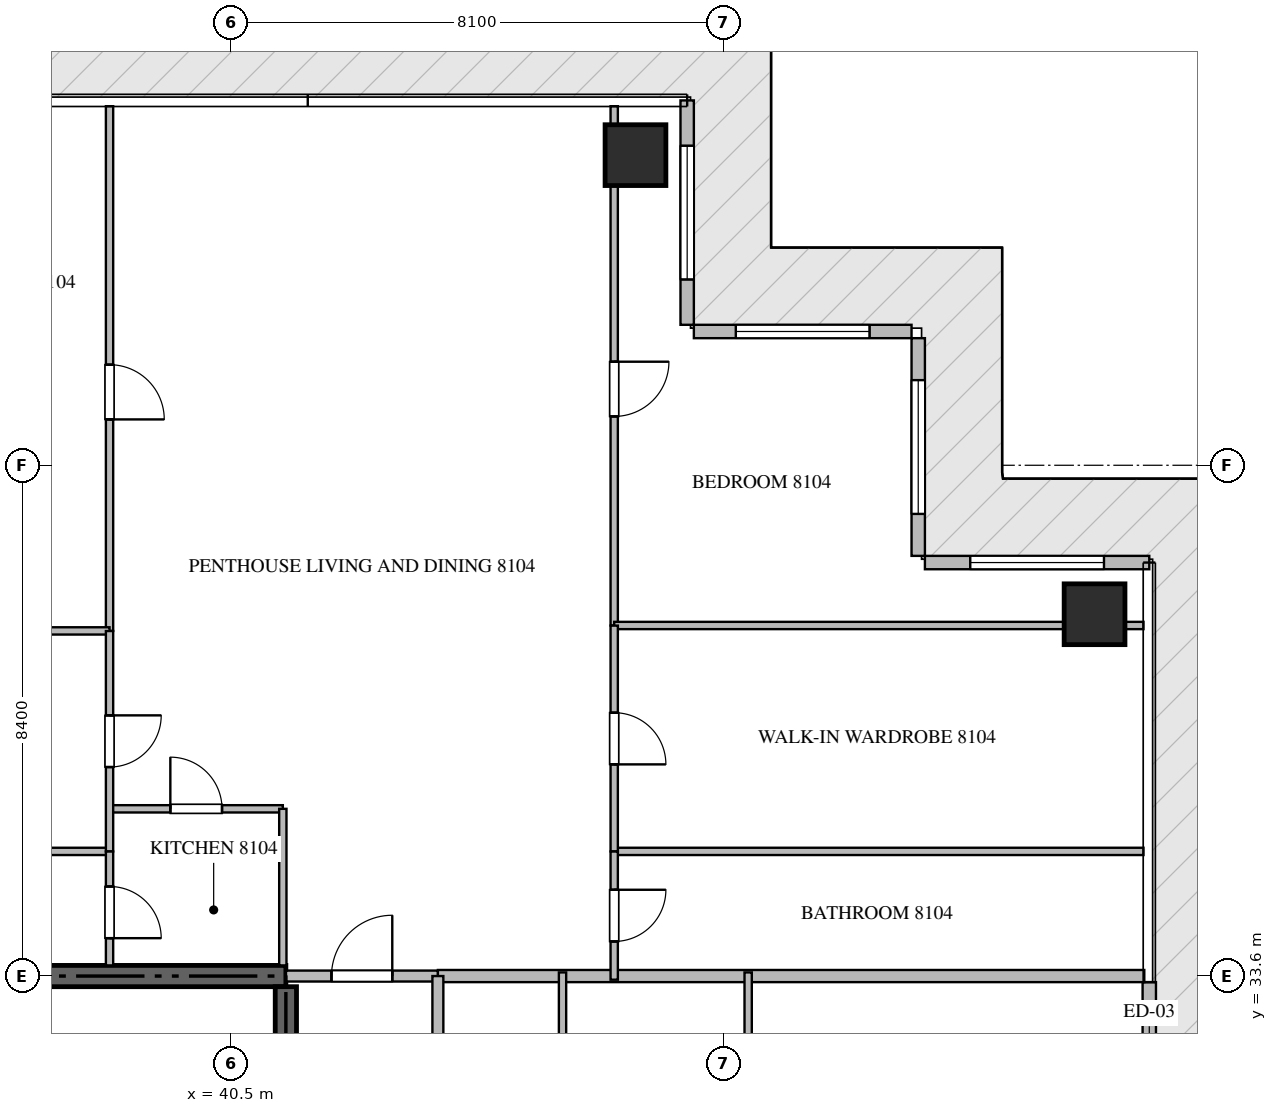
"""IFC4 building model, lengths in metres.
Left out: names, types, materials, properties, quantities, classifications, styles, units other than length and angle.
Written with IfcOpenShell. Run it as: python <this file> out.ifc"""

import sys

from ifc_helpers import new_model, si_unit, direction, frame, frame_2d, origin, origin_2d, place, context, subcontext, project, spatial, rectangle, extrude, source, transform, mapped, element, fill, save


model = new_model("IFC4")
c1 = context("Model", 3, precision=1e-05, world=origin(), true_north=direction((0.0, 1.0)))
c2 = subcontext(c1, "Body", "Model", "MODEL_VIEW")
j1 = project(units=[si_unit("LENGTHUNIT", "METRE"), si_unit("PLANEANGLEUNIT", "RADIAN")], contexts=[c1])
p1 = place(None, origin())
s1 = spatial("IfcSite", under=j1, at=p1, CompositionType="ELEMENT")
p2 = place(p1, origin())
s2 = spatial("IfcBuilding", under=s1, at=p2, CompositionType="ELEMENT")
p3 = place(p2, frame((0.0, 0.0, 325.85)))
s3 = spatial("IfcBuildingStorey", under=s2, at=p3, CompositionType="ELEMENT", Elevation=325.85)
p4 = place(p3, frame((41.4, 33.6, -0.26), z_axis=(0.0, 0.0, 1.0), x_axis=(-1.0, 0.0, 0.0)))
e1 = element("IfcWall", 1, at=p4, inside=s3, PredefinedType="SHEAR", context=c2, shape_type="SweptSolid", body=[
    extrude(rectangle(XDim=18.0, YDim=0.35, at=frame_2d((9.0, 0.0))), origin(), (0.0, 0.0, 1.0), 4.048),
])
p5 = place(p3, frame((41.4, 27.75, -0.26), z_axis=(0.0, 0.0, 1.0), x_axis=(0.0, 1.0, 0.0)))
e2 = element("IfcWall", 2, at=p5, inside=s3, PredefinedType="SHEAR", context=c2, shape_type="SweptSolid", body=[
    extrude(rectangle(XDim=5.675, YDim=0.35, at=frame_2d((2.837, 0.0))), origin(), (0.0, 0.0, 1.0), 4.048),
])
m1 = source(origin(), c2, "Body", "SweptSolid", [
    extrude(rectangle(XDim=1.0, YDim=1.0, at=origin_2d()), origin(), (0.0, 0.0, 1.0), 4.05),
])
for number, where, z_axis, x_axis in (
    (3, (47.15, 47.1, -0.26), (0.0, 0.0, 1.0), (1.0, 0.0, 0.0)),
    (4, (54.7, 39.55, -0.26), (0.0, 0.0, 1.0), (1.0, 0.0, 0.0)),
):
    element("IfcColumn", number, at=place(p3, frame(where, z_axis=z_axis, x_axis=x_axis)), inside=s3, PredefinedType="COLUMN", context=c2, shape_type="MappedRepresentation", body=[
        mapped(m1, transform((0.0, 0.0, 0.0), scale=1.0)),
    ])
p6 = place(p3, frame((55.6, 30.5, 0.0), z_axis=(0.0, 0.0, 1.0), x_axis=(0.0, 1.0, 0.0)))
e5 = element("IfcWall", 5, at=p6, inside=s3, PredefinedType="ELEMENTEDWALL", context=c2, shape_type="SweptSolid", body=[
    extrude(rectangle(XDim=3.0, YDim=0.22, at=frame_2d((1.5, 0.0))), origin(), (0.0, 0.0, 1.0), 3.775),
])
p7 = place(p6, frame((0.95, 0.0, 0.0)))
e6 = element("IfcOpeningElement", 6, at=p7, cuts=e5, PredefinedType="OPENING", context=c2, shape_type="SweptSolid", body=[
    extrude(rectangle(XDim=1.1, YDim=2.2, at=frame_2d((0.55, 1.1))), frame((0.0, 0.12, 0.0), z_axis=(0.0, -1.0, 0.0), x_axis=(1.0, 0.0, 0.0)), (0.0, 0.0, 1.0), 0.24),
])
p8 = place(p3, frame((55.6, 40.4, 0.0), z_axis=(0.0, 0.0, 1.0), x_axis=(-1.0, 0.0, 0.0)))
e7 = element("IfcWall", 7, at=p8, inside=s3, PredefinedType="ELEMENTEDWALL", context=c2, shape_type="SweptSolid", body=[
    extrude(rectangle(XDim=3.69, YDim=0.22, at=frame_2d((1.845, 0.0))), origin(), (0.0, 0.0, 1.0), 3.775),
])
p9 = place(p8, frame((0.745, 0.0, 0.65)))
e8 = element("IfcOpeningElement", 8, at=p9, cuts=e7, PredefinedType="OPENING", context=c2, shape_type="SweptSolid", body=[
    extrude(rectangle(XDim=2.2, YDim=2.4, at=frame_2d((1.1, 1.2))), frame((0.0, 0.12, 0.0), z_axis=(0.0, -1.0, 0.0), x_axis=(1.0, 0.0, 0.0)), (0.0, 0.0, 1.0), 0.24),
])
p10 = place(p3, frame((51.8, 40.51, 0.0), z_axis=(0.0, 0.0, 1.0), x_axis=(0.0, 1.0, 0.0)))
e9 = element("IfcWall", 9, at=p10, inside=s3, PredefinedType="ELEMENTEDWALL", context=c2, shape_type="SweptSolid", body=[
    extrude(rectangle(XDim=3.58, YDim=0.22, at=frame_2d((1.79, 0.0))), origin(), (0.0, 0.0, 1.0), 3.775),
])
p11 = place(p10, frame((0.69, 0.0, 0.65)))
e10 = element("IfcOpeningElement", 10, at=p11, cuts=e9, PredefinedType="OPENING", context=c2, shape_type="SweptSolid", body=[
    extrude(rectangle(XDim=2.2, YDim=2.4, at=frame_2d((1.1, 1.2))), frame((0.0, 0.12, 0.0), z_axis=(0.0, -1.0, 0.0), x_axis=(1.0, 0.0, 0.0)), (0.0, 0.0, 1.0), 0.24),
])
p12 = place(p3, frame((51.69, 44.2, 0.0), z_axis=(0.0, 0.0, 1.0), x_axis=(-1.0, 0.0, 0.0)))
e11 = element("IfcWall", 11, at=p12, inside=s3, PredefinedType="ELEMENTEDWALL", context=c2, shape_type="SweptSolid", body=[
    extrude(rectangle(XDim=3.58, YDim=0.22, at=frame_2d((1.79, 0.0))), origin(), (0.0, 0.0, 1.0), 3.775),
])
p13 = place(p12, frame((0.69, 0.0, 0.65)))
e12 = element("IfcOpeningElement", 12, at=p13, cuts=e11, PredefinedType="OPENING", context=c2, shape_type="SweptSolid", body=[
    extrude(rectangle(XDim=2.2, YDim=2.4, at=frame_2d((1.1, 1.2))), frame((0.0, 0.12, 0.0), z_axis=(0.0, -1.0, 0.0), x_axis=(1.0, 0.0, 0.0)), (0.0, 0.0, 1.0), 0.24),
])
p14 = place(p3, frame((48.0, 44.31, 0.0), z_axis=(0.0, 0.0, 1.0), x_axis=(0.0, 1.0, 0.0)))
e13 = element("IfcWall", 13, at=p14, inside=s3, PredefinedType="ELEMENTEDWALL", context=c2, shape_type="SweptSolid", body=[
    extrude(rectangle(XDim=3.69, YDim=0.22, at=frame_2d((1.845, 0.0))), origin(), (0.0, 0.0, 1.0), 3.775),
])
p15 = place(p14, frame((0.745, 0.0, 0.65)))
e14 = element("IfcOpeningElement", 14, at=p15, cuts=e13, PredefinedType="OPENING", context=c2, shape_type="SweptSolid", body=[
    extrude(rectangle(XDim=2.2, YDim=2.4, at=frame_2d((1.1, 1.2))), frame((0.0, 0.12, 0.0), z_axis=(0.0, -1.0, 0.0), x_axis=(1.0, 0.0, 0.0)), (0.0, 0.0, 1.0), 0.24),
])
p16 = place(p3, frame((43.9, 33.6, 0.0), z_axis=(0.0, 0.0, 1.0), x_axis=(1.0, 0.0, 0.0)))
e15 = element("IfcWall", 15, at=p16, inside=s3, PredefinedType="PARTITIONING", context=c2, shape_type="SweptSolid", body=[
    extrude(rectangle(XDim=11.618, YDim=0.2, at=frame_2d((5.809, 0.0))), origin(), (0.0, 0.0, 1.0), 3.79),
])
p17 = place(p3, frame((41.402, 33.6, 0.0), z_axis=(0.0, 0.0, 1.0), x_axis=(1.0, 0.0, 0.0)))
e16 = element("IfcWall", 16, at=p17, inside=s3, PredefinedType="PARTITIONING", context=c2, shape_type="SweptSolid", body=[
    extrude(rectangle(XDim=2.496, YDim=0.18, at=frame_2d((1.248, 0.0))), origin(), (0.0, 0.0, 1.0), 3.79),
])
p18 = place(p17, frame((0.748, 0.0, 0.0)))
e17 = element("IfcOpeningElement", 17, at=p18, cuts=e16, PredefinedType="OPENING", context=c2, shape_type="SweptSolid", body=[
    extrude(rectangle(XDim=1.0, YDim=2.15, at=frame_2d((0.5, 1.075))), frame((0.0, 0.1, 0.0), z_axis=(0.0, -1.0, 0.0), x_axis=(1.0, 0.0, 0.0)), (0.0, 0.0, 1.0), 0.2),
])
p19 = place(p3, frame((43.9, 16.8, 0.0), z_axis=(0.0, 0.0, 1.0), x_axis=(0.0, 1.0, 0.0)))
e18 = element("IfcWall", 18, at=p19, inside=s3, PredefinedType="PARTITIONING", context=c2, shape_type="SweptSolid", body=[
    extrude(rectangle(XDim=16.8, YDim=0.18, at=frame_2d((8.4, 0.0))), origin(), (0.0, 0.0, 1.0), 3.79),
])
p20 = place(p19, frame((4.598, 0.0, 0.0)))
e19 = element("IfcOpeningElement", 19, at=p20, cuts=e18, PredefinedType="OPENING", context=c2, shape_type="SweptSolid", body=[
    extrude(rectangle(XDim=1.0, YDim=2.15, at=frame_2d((0.5, 1.075))), frame((0.0, 0.1, 0.0), z_axis=(0.0, -1.0, 0.0), x_axis=(1.0, 0.0, 0.0)), (0.0, 0.0, 1.0), 0.2),
])
p21 = place(p19, frame((8.801, 0.0, 0.0)))
e20 = element("IfcOpeningElement", 20, at=p21, cuts=e18, PredefinedType="OPENING", context=c2, shape_type="SweptSolid", body=[
    extrude(rectangle(XDim=1.0, YDim=2.15, at=frame_2d((0.5, 1.075))), frame((0.0, 0.1, 0.0), z_axis=(0.0, -1.0, 0.0), x_axis=(1.0, 0.0, 0.0)), (0.0, 0.0, 1.0), 0.2),
])
p22 = place(p3, frame((38.5, 36.35, 0.0), z_axis=(0.0, 0.0, 1.0), x_axis=(1.0, 0.0, 0.0)))
e21 = element("IfcWall", 21, at=p22, inside=s3, PredefinedType="PARTITIONING", context=c2, shape_type="SweptSolid", body=[
    extrude(rectangle(XDim=2.85, YDim=0.12, at=frame_2d((1.425, 0.0))), origin(), (0.0, 0.0, 1.0), 3.512),
])
p23 = place(p22, frame((1.0, 0.0, 0.0)))
e22 = element("IfcOpeningElement", 22, at=p23, cuts=e21, PredefinedType="OPENING", context=c2, shape_type="SweptSolid", body=[
    extrude(rectangle(XDim=0.85, YDim=2.1, at=frame_2d((0.425, 1.05))), frame((0.0, 0.07, 0.0), z_axis=(0.0, -1.0, 0.0), x_axis=(1.0, 0.0, 0.0)), (0.0, 0.0, 1.0), 0.14),
])
p24 = place(p3, frame((41.35, 36.35, 0.0), z_axis=(0.0, 0.0, 1.0), x_axis=(0.0, -1.0, 0.0)))
e23 = element("IfcWall", 23, at=p24, inside=s3, PredefinedType="PARTITIONING", context=c2, shape_type="SweptSolid", body=[
    extrude(rectangle(XDim=2.575, YDim=0.12, at=frame_2d((1.288, 0.0))), origin(), (0.0, 0.0, 1.0), 3.79),
])
p25 = place(p3, frame((38.5, 47.905, 0.0), z_axis=(0.0, 0.0, 1.0), x_axis=(0.0, -1.0, 0.0)))
e24 = element("IfcWall", 24, at=p25, inside=s3, PredefinedType="PARTITIONING", context=c2, shape_type="SweptSolid", body=[
    extrude(rectangle(XDim=8.629, YDim=0.12, at=frame_2d((4.314, 0.0))), origin(), (0.0, 0.0, 1.0), 3.79),
])
p26 = place(p25, frame((4.251, 0.0, 0.0)))
e25 = element("IfcOpeningElement", 25, at=p26, cuts=e24, PredefinedType="OPENING", context=c2, shape_type="SweptSolid", body=[
    extrude(rectangle(XDim=0.9, YDim=2.1, at=frame_2d((0.45, 1.05))), frame((0.0, 0.07, 0.0), z_axis=(0.0, -1.0, 0.0), x_axis=(1.0, 0.0, 0.0)), (0.0, 0.0, 1.0), 0.14),
])
p27 = place(p3, frame((33.54, 39.276, 0.0), z_axis=(0.0, 0.0, 1.0), x_axis=(1.0, 0.0, 0.0)))
e26 = element("IfcWall", 26, at=p27, inside=s3, PredefinedType="PARTITIONING", context=c2, shape_type="SweptSolid", body=[
    extrude(rectangle(XDim=4.96, YDim=0.12, at=frame_2d((2.48, 0.0))), origin(), (0.0, 0.0, 1.0), 3.79),
])
p28 = place(p3, frame((33.662, 35.65, 0.0), z_axis=(0.0, 0.0, 1.0), x_axis=(1.0, 0.0, 0.0)))
e27 = element("IfcWall", 27, at=p28, inside=s3, PredefinedType="PARTITIONING", context=c2, shape_type="SweptSolid", body=[
    extrude(rectangle(XDim=4.838, YDim=0.12, at=frame_2d((2.419, 0.0))), origin(), (0.0, 0.0, 1.0), 3.79),
])
p29 = place(p3, frame((38.5, 39.274, 0.0), z_axis=(0.0, 0.0, 1.0), x_axis=(0.0, -1.0, 0.0)))
e28 = element("IfcWall", 28, at=p29, inside=s3, PredefinedType="PARTITIONING", context=c2, shape_type="SweptSolid", body=[
    extrude(rectangle(XDim=3.624, YDim=0.12, at=frame_2d((1.812, 0.0))), origin(), (0.0, 0.0, 1.0), 3.79),
])
p30 = place(p29, frame((1.387, 0.0, 0.0)))
e29 = element("IfcOpeningElement", 29, at=p30, cuts=e28, PredefinedType="OPENING", context=c2, shape_type="SweptSolid", body=[
    extrude(rectangle(XDim=0.85, YDim=2.1, at=frame_2d((0.425, 1.05))), frame((0.0, 0.07, 0.0), z_axis=(0.0, -1.0, 0.0), x_axis=(1.0, 0.0, 0.0)), (0.0, 0.0, 1.0), 0.14),
])
p31 = place(p3, frame((38.5, 35.648, 0.0), z_axis=(0.0, 0.0, 1.0), x_axis=(0.0, -1.0, 0.0)))
e30 = element("IfcWall", 30, at=p31, inside=s3, PredefinedType="PARTITIONING", context=c2, shape_type="SweptSolid", body=[
    extrude(rectangle(XDim=1.873, YDim=0.12, at=frame_2d((0.937, 0.0))), origin(), (0.0, 0.0, 1.0), 3.79),
])
p32 = place(p31, frame((0.575, 0.0, 0.0)))
e31 = element("IfcOpeningElement", 31, at=p32, cuts=e30, PredefinedType="OPENING", context=c2, shape_type="SweptSolid", body=[
    extrude(rectangle(XDim=0.85, YDim=2.1, at=frame_2d((0.425, 1.05))), frame((0.0, 0.07, 0.0), z_axis=(0.0, -1.0, 0.0), x_axis=(1.0, 0.0, 0.0)), (0.0, 0.0, 1.0), 0.14),
])
p33 = place(p3, frame((46.8, 47.905, 0.0), z_axis=(0.0, 0.0, 1.0), x_axis=(0.0, -1.0, 0.0)))
e32 = element("IfcWall", 32, at=p33, inside=s3, PredefinedType="PARTITIONING", context=c2, shape_type="SweptSolid", body=[
    extrude(rectangle(XDim=8.54, YDim=0.12, at=frame_2d((4.27, 0.0))), origin(), (0.0, 0.0, 1.0), 3.79),
])
p34 = place(p33, frame((4.202, 0.0, 0.0)))
e33 = element("IfcOpeningElement", 33, at=p34, cuts=e32, PredefinedType="OPENING", context=c2, shape_type="SweptSolid", body=[
    extrude(rectangle(XDim=0.9, YDim=2.1, at=frame_2d((0.45, 1.05))), frame((0.0, 0.07, 0.0), z_axis=(0.0, -1.0, 0.0), x_axis=(1.0, 0.0, 0.0)), (0.0, 0.0, 1.0), 0.14),
])
p35 = place(p3, frame((46.8, 39.365, 0.0), z_axis=(0.0, 0.0, 1.0), x_axis=(1.0, 0.0, 0.0)))
e34 = element("IfcWall", 34, at=p35, inside=s3, PredefinedType="PARTITIONING", context=c2, shape_type="SweptSolid", body=[
    extrude(rectangle(XDim=8.705, YDim=0.12, at=frame_2d((4.353, 0.0))), origin(), (0.0, 0.0, 1.0), 3.292),
])
p36 = place(p3, frame((46.8, 35.65, 0.0), z_axis=(0.0, 0.0, 1.0), x_axis=(1.0, 0.0, 0.0)))
e35 = element("IfcWall", 35, at=p36, inside=s3, PredefinedType="PARTITIONING", context=c2, shape_type="SweptSolid", body=[
    extrude(rectangle(XDim=8.705, YDim=0.12, at=frame_2d((4.353, 0.0))), origin(), (0.0, 0.0, 1.0), 3.79),
])
p37 = place(p3, frame((46.8, 39.363, 0.0), z_axis=(0.0, 0.0, 1.0), x_axis=(0.0, -1.0, 0.0)))
e36 = element("IfcWall", 36, at=p37, inside=s3, PredefinedType="PARTITIONING", context=c2, shape_type="SweptSolid", body=[
    extrude(rectangle(XDim=3.713, YDim=0.12, at=frame_2d((1.856, 0.0))), origin(), (0.0, 0.0, 1.0), 3.79),
])
p38 = place(p37, frame((1.432, 0.0, 0.0)))
e37 = element("IfcOpeningElement", 37, at=p38, cuts=e36, PredefinedType="OPENING", context=c2, shape_type="SweptSolid", body=[
    extrude(rectangle(XDim=0.85, YDim=2.1, at=frame_2d((0.425, 1.05))), frame((0.0, 0.07, 0.0), z_axis=(0.0, -1.0, 0.0), x_axis=(1.0, 0.0, 0.0)), (0.0, 0.0, 1.0), 0.14),
])
p39 = place(p3, frame((46.8, 35.648, 0.0), z_axis=(0.0, 0.0, 1.0), x_axis=(0.0, -1.0, 0.0)))
e38 = element("IfcWall", 38, at=p39, inside=s3, PredefinedType="PARTITIONING", context=c2, shape_type="SweptSolid", body=[
    extrude(rectangle(XDim=2.108, YDim=0.12, at=frame_2d((1.054, 0.0))), origin(), (0.0, 0.0, 1.0), 3.79),
])
p40 = place(p39, frame((0.629, 0.0, 0.0)))
e39 = element("IfcOpeningElement", 39, at=p40, cuts=e38, PredefinedType="OPENING", context=c2, shape_type="SweptSolid", body=[
    extrude(rectangle(XDim=0.85, YDim=2.1, at=frame_2d((0.425, 1.05))), frame((0.0, 0.07, 0.0), z_axis=(0.0, -1.0, 0.0), x_axis=(1.0, 0.0, 0.0)), (0.0, 0.0, 1.0), 0.14),
])
for number, where, z_axis, x_axis in (
    (40, (49.003, 27.8, 0.0), (0.0, 0.0, 1.0), (0.0, 1.0, 0.0)),
    (41, (45.95, 27.8, 0.0), (0.0, 0.0, 1.0), (0.0, 1.0, 0.0)),
):
    element("IfcWall", number, at=place(p3, frame(where, z_axis=z_axis, x_axis=x_axis)), inside=s3, PredefinedType="PARTITIONING", context=c2, shape_type="SweptSolid", body=[
        extrude(rectangle(XDim=5.86, YDim=0.12, at=frame_2d((2.93, 0.0))), origin(), (0.0, 0.0, 1.0), 3.79),
    ])
m2 = source(origin(), c2, "Body", "SweptSolid", [
    extrude(rectangle(XDim=2.2, YDim=2.4, at=frame_2d((1.1, 1.2))), frame((0.0, 0.03, 0.0), z_axis=(0.0, -1.0, 0.0), x_axis=(1.0, 0.0, 0.0)), (0.0, 0.0, 1.0), 0.06),
])
p41 = place(p9, origin())
e42 = element("IfcWindow", 42, at=p41, inside=s3, PartitioningType="SINGLE_PANEL", PredefinedType="WINDOW", context=c2, shape_type="MappedRepresentation", body=[
    mapped(m2, transform((0.0, 0.0, 0.0), scale=1.0)),
])
fill(e8, e42)
p42 = place(p11, origin())
e43 = element("IfcWindow", 43, at=p42, inside=s3, PartitioningType="SINGLE_PANEL", PredefinedType="WINDOW", context=c2, shape_type="MappedRepresentation", body=[
    mapped(m2, transform((0.0, 0.0, 0.0), scale=1.0)),
])
fill(e10, e43)
p43 = place(p13, origin())
e44 = element("IfcWindow", 44, at=p43, inside=s3, PartitioningType="SINGLE_PANEL", PredefinedType="WINDOW", context=c2, shape_type="MappedRepresentation", body=[
    mapped(m2, transform((0.0, 0.0, 0.0), scale=1.0)),
])
fill(e12, e44)
p44 = place(p15, origin())
e45 = element("IfcWindow", 45, at=p44, inside=s3, PartitioningType="SINGLE_PANEL", PredefinedType="WINDOW", context=c2, shape_type="MappedRepresentation", body=[
    mapped(m2, transform((0.0, 0.0, 0.0), scale=1.0)),
])
fill(e14, e45)
m3 = source(origin(), c2, "Body", "SweptSolid", [
    extrude(rectangle(XDim=1.0, YDim=2.15, at=frame_2d((0.5, 1.075))), frame((0.0, 0.025, 0.0), z_axis=(0.0, -1.0, 0.0), x_axis=(1.0, 0.0, 0.0)), (0.0, 0.0, 1.0), 0.05),
])
p45 = place(p18, origin())
e46 = element("IfcDoor", 46, at=p45, inside=s3, OperationType="SINGLE_SWING_RIGHT", PredefinedType="DOOR", context=c2, shape_type="MappedRepresentation", body=[
    mapped(m3, transform((0.0, 0.0, 0.0), scale=1.0)),
])
fill(e17, e46)
m4 = source(origin(), c2, "Body", "SweptSolid", [
    extrude(rectangle(XDim=0.85, YDim=2.1, at=frame_2d((0.425, 1.05))), frame((0.0, 0.025, 0.0), z_axis=(0.0, -1.0, 0.0), x_axis=(1.0, 0.0, 0.0)), (0.0, 0.0, 1.0), 0.05),
])
p46 = place(p23, origin())
e47 = element("IfcDoor", 47, at=p46, inside=s3, OperationType="SINGLE_SWING_LEFT", PredefinedType="DOOR", context=c2, shape_type="MappedRepresentation", body=[
    mapped(m4, transform((0.0, 0.0, 0.0), scale=1.0)),
])
fill(e22, e47)
m5 = source(origin(), c2, "Body", "SweptSolid", [
    extrude(rectangle(XDim=0.9, YDim=2.1, at=frame_2d((0.45, 1.05))), frame((0.0, 0.025, 0.0), z_axis=(0.0, -1.0, 0.0), x_axis=(1.0, 0.0, 0.0)), (0.0, 0.0, 1.0), 0.05),
])
p47 = place(p26, origin())
e48 = element("IfcDoor", 48, at=p47, inside=s3, OperationType="SINGLE_SWING_RIGHT", PredefinedType="DOOR", context=c2, shape_type="MappedRepresentation", body=[
    mapped(m5, transform((0.0, 0.0, 0.0), scale=1.0)),
])
fill(e25, e48)
p48 = place(p30, origin())
e49 = element("IfcDoor", 49, at=p48, inside=s3, OperationType="SINGLE_SWING_LEFT", PredefinedType="DOOR", context=c2, shape_type="MappedRepresentation", body=[
    mapped(m4, transform((0.0, 0.0, 0.0), scale=1.0)),
])
fill(e29, e49)
p49 = place(p32, origin())
e50 = element("IfcDoor", 50, at=p49, inside=s3, OperationType="SINGLE_SWING_RIGHT", PredefinedType="DOOR", context=c2, shape_type="MappedRepresentation", body=[
    mapped(m4, transform((0.0, 0.0, 0.0), scale=1.0)),
])
fill(e31, e50)
p50 = place(p34, origin())
e51 = element("IfcDoor", 51, at=p50, inside=s3, OperationType="SINGLE_SWING_LEFT", PredefinedType="DOOR", context=c2, shape_type="MappedRepresentation", body=[
    mapped(m5, transform((0.0, 0.0, 0.0), scale=1.0)),
])
fill(e33, e51)
p51 = place(p38, origin())
e52 = element("IfcDoor", 52, at=p51, inside=s3, OperationType="SINGLE_SWING_RIGHT", PredefinedType="DOOR", context=c2, shape_type="MappedRepresentation", body=[
    mapped(m4, transform((0.0, 0.0, 0.0), scale=1.0)),
])
fill(e37, e52)
p52 = place(p40, origin())
e53 = element("IfcDoor", 53, at=p52, inside=s3, OperationType="SINGLE_SWING_LEFT", PredefinedType="DOOR", context=c2, shape_type="MappedRepresentation", body=[
    mapped(m4, transform((0.0, 0.0, 0.0), scale=1.0)),
])
fill(e39, e53)
save(model, sys.argv[1])
